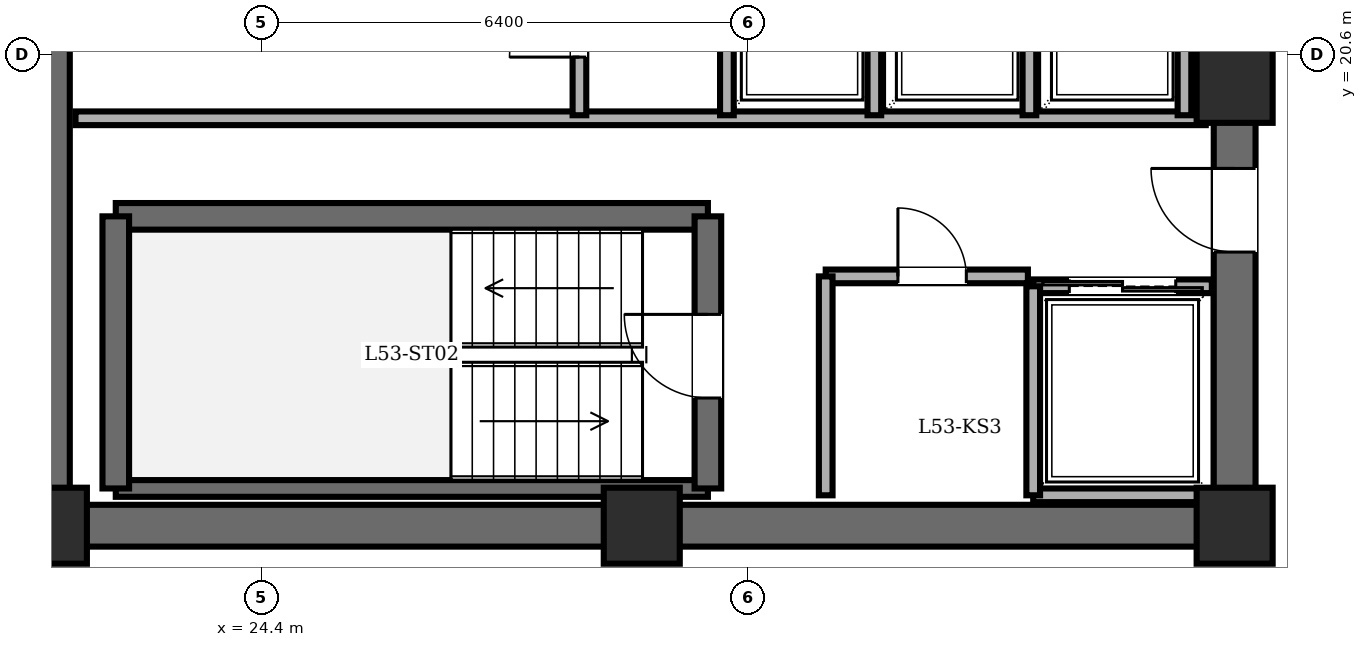
"""IFC4 building model, lengths in metres.
Left out: names, types, materials, properties, quantities, classifications, styles, units other than length and angle.
Written with IfcOpenShell. Run it as: python <this file> out.ifc"""

import sys

from ifc_helpers import new_model, si_unit, direction, frame, frame_2d, origin, origin_2d, place, context, subcontext, project, spatial, rectangle, extrude, element, fill, save


model = new_model("IFC4")
c1 = context("Model", 3, precision=1e-05, world=origin(), true_north=direction((0.0, 1.0)))
c2 = subcontext(c1, "Body", "Model", "MODEL_VIEW")
j1 = project(units=[si_unit("LENGTHUNIT", "METRE"), si_unit("PLANEANGLEUNIT", "RADIAN")], contexts=[c1])
p1 = place(None, origin())
s1 = spatial("IfcSite", under=j1, at=p1, CompositionType="ELEMENT")
p2 = place(p1, origin())
s2 = spatial("IfcBuilding", under=s1, at=p2, CompositionType="ELEMENT")
p3 = place(p2, frame((0.0, 0.0, 204.9)))
s3 = spatial("IfcBuildingStorey", under=s2, at=p3, CompositionType="ELEMENT", Elevation=204.9)
for number, where, z_axis, x_axis in (
    (1, (21.6, 14.4, 0.0), (0.0, 0.0, 1.0), (1.0, 0.0, 0.0)),
    (2, (29.4, 14.4, 0.0), (0.0, 0.0, 1.0), (1.0, 0.0, 0.0)),
    (3, (37.2, 14.4, 0.0), (0.0, 0.0, 1.0), (1.0, 0.0, 0.0)),
    (4, (37.2, 20.2, 0.0), (0.0, 0.0, 1.0), (1.0, 0.0, 0.0)),
):
    element("IfcColumn", number, at=place(p3, frame(where, z_axis=z_axis, x_axis=x_axis)), inside=s3, PredefinedType="COLUMN", context=c2, shape_type="SweptSolid", body=[
        extrude(rectangle(XDim=1.0, YDim=1.0, at=origin_2d()), origin(), (0.0, 0.0, 1.0), 3.6),
    ])
p4 = place(p3, frame((21.6, 14.4, 0.0), z_axis=(0.0, 0.0, 1.0), x_axis=(0.0, 1.0, 0.0)))
e5 = element("IfcWall", 5, at=p4, inside=s3, PredefinedType="SHEAR", context=c2, shape_type="SweptSolid", body=[
    extrude(rectangle(XDim=19.2, YDim=0.55, at=frame_2d((9.6, 0.0))), origin(), (0.0, 0.0, 1.0), 3.4),
])
p5 = place(p3, frame((37.2, 14.4, 0.0), z_axis=(0.0, 0.0, 1.0), x_axis=(-1.0, 0.0, 0.0)))
e6 = element("IfcWall", 6, at=p5, inside=s3, PredefinedType="SHEAR", context=c2, shape_type="SweptSolid", body=[
    extrude(rectangle(XDim=15.6, YDim=0.55, at=frame_2d((7.8, 0.0))), origin(), (0.0, 0.0, 1.0), 3.4),
])
p6 = place(p3, frame((37.2, 14.4, 0.0), z_axis=(0.0, 0.0, 1.0), x_axis=(0.0, 1.0, 0.0)))
e7 = element("IfcWall", 7, at=p6, inside=s3, PredefinedType="SHEAR", context=c2, shape_type="SweptSolid", body=[
    extrude(rectangle(XDim=19.2, YDim=0.55, at=frame_2d((9.6, 0.0))), origin(), (0.0, 0.0, 1.0), 3.4),
])
p7 = place(p6, frame((15.8, 0.0, 0.0)))
e8 = element("IfcOpeningElement", 8, at=p7, cuts=e7, PredefinedType="OPENING", context=c2, shape_type="SweptSolid", body=[
    extrude(rectangle(XDim=1.15, YDim=2.15, at=frame_2d((0.575, 1.075))), frame((0.0, 0.285, 0.0), z_axis=(0.0, -1.0, 0.0), x_axis=(1.0, 0.0, 0.0)), (0.0, 0.0, 1.0), 0.57),
])
p8 = place(p6, frame((3.6, 0.0, 0.0)))
e9 = element("IfcOpeningElement", 9, at=p8, cuts=e7, PredefinedType="OPENING", context=c2, shape_type="SweptSolid", body=[
    extrude(rectangle(XDim=1.1, YDim=2.15, at=frame_2d((0.55, 1.075))), frame((0.0, 0.285, 0.0), z_axis=(0.0, -1.0, 0.0), x_axis=(1.0, 0.0, 0.0)), (0.0, 0.0, 1.0), 0.57),
])
p9 = place(p6, frame((8.6, 0.0, 0.0)))
e10 = element("IfcOpeningElement", 10, at=p9, cuts=e7, PredefinedType="OPENING", context=c2, shape_type="SweptSolid", body=[
    extrude(rectangle(XDim=1.3, YDim=2.2, at=frame_2d((0.65, 1.1))), frame((0.0, 0.285, 0.0), z_axis=(0.0, -1.0, 0.0), x_axis=(1.0, 0.0, 0.0)), (0.0, 0.0, 1.0), 0.57),
])
p10 = place(p3, frame((22.48, 18.47, 0.0), z_axis=(0.0, 0.0, 1.0), x_axis=(1.0, 0.0, 0.0)))
e11 = element("IfcWall", 11, at=p10, inside=s3, PredefinedType="SOLIDWALL", context=c2, shape_type="SweptSolid", body=[
    extrude(rectangle(XDim=7.79, YDim=0.35, at=frame_2d((3.895, 0.0))), origin(), (0.0, 0.0, 1.0), 3.4),
])
p11 = place(p3, frame((22.48, 14.89, 0.0), z_axis=(0.0, 0.0, 1.0), x_axis=(1.0, 0.0, 0.0)))
e12 = element("IfcWall", 12, at=p11, inside=s3, PredefinedType="PARTITIONING", context=c2, shape_type="SweptSolid", body=[
    extrude(rectangle(XDim=7.79, YDim=0.22, at=frame_2d((3.895, 0.0))), origin(), (0.0, 0.0, 1.0), 3.4),
])
p12 = place(p3, frame((22.48, 14.89, 0.0), z_axis=(0.0, 0.0, 1.0), x_axis=(0.0, 1.0, 0.0)))
e13 = element("IfcWall", 13, at=p12, inside=s3, PredefinedType="SOLIDWALL", context=c2, shape_type="SweptSolid", body=[
    extrude(rectangle(XDim=3.58, YDim=0.35, at=frame_2d((1.79, 0.0))), origin(), (0.0, 0.0, 1.0), 3.4),
])
p13 = place(p3, frame((30.27, 14.89, 0.0), z_axis=(0.0, 0.0, 1.0), x_axis=(0.0, 1.0, 0.0)))
e14 = element("IfcWall", 14, at=p13, inside=s3, PredefinedType="SOLIDWALL", context=c2, shape_type="SweptSolid", body=[
    extrude(rectangle(XDim=3.58, YDim=0.35, at=frame_2d((1.79, 0.0))), origin(), (0.0, 0.0, 1.0), 3.4),
])
p14 = place(p13, frame((1.19, 0.0, 0.0)))
e15 = element("IfcOpeningElement", 15, at=p14, cuts=e14, PredefinedType="OPENING", context=c2, shape_type="SweptSolid", body=[
    extrude(rectangle(XDim=1.1, YDim=2.15, at=frame_2d((0.55, 1.075))), frame((0.0, 0.185, 0.0), z_axis=(0.0, -1.0, 0.0), x_axis=(1.0, 0.0, 0.0)), (0.0, 0.0, 1.0), 0.37),
])
p15 = place(p3, frame((21.95, 19.76, 0.0), z_axis=(0.0, 0.0, 1.0), x_axis=(1.0, 0.0, 0.0)))
e16 = element("IfcWall", 16, at=p15, inside=s3, PredefinedType="PARTITIONING", context=c2, shape_type="SweptSolid", body=[
    extrude(rectangle(XDim=14.87, YDim=0.18, at=frame_2d((7.435, 0.0))), origin(), (0.0, 0.0, 1.0), 3.4),
])
p16 = place(p3, frame((31.82, 17.68, 0.0), z_axis=(0.0, 0.0, 1.0), x_axis=(1.0, 0.0, 0.0)))
e17 = element("IfcWall", 17, at=p16, inside=s3, PredefinedType="PARTITIONING", context=c2, shape_type="SweptSolid", body=[
    extrude(rectangle(XDim=2.66, YDim=0.18, at=frame_2d((1.33, 0.0))), origin(), (0.0, 0.0, 1.0), 3.4),
])
p17 = place(p16, frame((0.95, 0.0, 0.0)))
e18 = element("IfcOpeningElement", 18, at=p17, cuts=e17, PredefinedType="OPENING", context=c2, shape_type="SweptSolid", body=[
    extrude(rectangle(XDim=0.9, YDim=2.05, at=frame_2d((0.45, 1.025))), frame((0.0, 0.1, 0.0), z_axis=(0.0, -1.0, 0.0), x_axis=(1.0, 0.0, 0.0)), (0.0, 0.0, 1.0), 0.2),
])
p18 = place(p3, frame((31.82, 14.8, 0.0), z_axis=(0.0, 0.0, 1.0), x_axis=(0.0, 1.0, 0.0)))
e19 = element("IfcWall", 19, at=p18, inside=s3, PredefinedType="PARTITIONING", context=c2, shape_type="SweptSolid", body=[
    extrude(rectangle(XDim=2.88, YDim=0.18, at=frame_2d((1.44, 0.0))), origin(), (0.0, 0.0, 1.0), 3.4),
])
p19 = place(p3, frame((34.55, 17.55, 0.0), z_axis=(0.0, 0.0, 1.0), x_axis=(1.0, 0.0, 0.0)))
e20 = element("IfcWall", 20, at=p19, inside=s3, PredefinedType="PARTITIONING", context=c2, shape_type="SweptSolid", body=[
    extrude(rectangle(XDim=2.35, YDim=0.18, at=frame_2d((1.175, 0.0))), origin(), (0.0, 0.0, 1.0), 3.4),
])
p20 = place(p19, frame((0.475, 0.0, 0.0)))
e21 = element("IfcOpeningElement", 21, at=p20, cuts=e20, PredefinedType="OPENING", context=c2, shape_type="SweptSolid", body=[
    extrude(rectangle(XDim=1.4, YDim=2.3, at=frame_2d((0.7, 1.15))), frame((0.0, 0.1, 0.0), z_axis=(0.0, -1.0, 0.0), x_axis=(1.0, 0.0, 0.0)), (0.0, 0.0, 1.0), 0.2),
])
p21 = place(p3, frame((36.9, 14.8, 0.0), z_axis=(0.0, 0.0, 1.0), x_axis=(-1.0, 0.0, 0.0)))
e22 = element("IfcWall", 22, at=p21, inside=s3, PredefinedType="PARTITIONING", context=c2, shape_type="SweptSolid", body=[
    extrude(rectangle(XDim=2.35, YDim=0.18, at=frame_2d((1.175, 0.0))), origin(), (0.0, 0.0, 1.0), 3.4),
])
p22 = place(p3, frame((34.55, 17.55, 0.0), z_axis=(0.0, 0.0, 1.0), x_axis=(0.0, -1.0, 0.0)))
e23 = element("IfcWall", 23, at=p22, inside=s3, PredefinedType="PARTITIONING", context=c2, shape_type="SweptSolid", body=[
    extrude(rectangle(XDim=2.75, YDim=0.18, at=frame_2d((1.375, 0.0))), origin(), (0.0, 0.0, 1.0), 3.4),
])
for number, where, z_axis, x_axis in (
    (24, (32.46, 19.8, 0.0), (0.0, 0.0, 1.0), (0.0, 1.0, 0.0)),
    (25, (34.5, 19.8, 0.0), (0.0, 0.0, 1.0), (0.0, 1.0, 0.0)),
    (26, (36.54, 19.8, 0.0), (0.0, 0.0, 1.0), (0.0, 1.0, 0.0)),
):
    element("IfcWall", number, at=place(p3, frame(where, z_axis=z_axis, x_axis=x_axis)), inside=s3, PredefinedType="PARTITIONING", context=c2, shape_type="SweptSolid", body=[
        extrude(rectangle(XDim=2.5, YDim=0.18, at=frame_2d((1.25, 0.0))), origin(), (0.0, 0.0, 1.0), 3.4),
    ])
p23 = place(p3, frame((30.52, 19.8, 0.0), z_axis=(0.0, 0.0, 1.0), x_axis=(0.0, 1.0, 0.0)))
e27 = element("IfcWall", 27, at=p23, inside=s3, PredefinedType="PARTITIONING", context=c2, shape_type="SweptSolid", body=[
    extrude(rectangle(XDim=2.55, YDim=0.18, at=frame_2d((1.275, 0.0))), origin(), (0.0, 0.0, 1.0), 3.4),
])
p24 = place(p3, frame((28.58, 19.8, 0.0), z_axis=(0.0, 0.0, 1.0), x_axis=(0.0, 1.0, 0.0)))
e28 = element("IfcWall", 28, at=p24, inside=s3, PredefinedType="PARTITIONING", context=c2, shape_type="SweptSolid", body=[
    extrude(rectangle(XDim=2.45, YDim=0.18, at=frame_2d((1.225, 0.0))), origin(), (0.0, 0.0, 1.0), 3.4),
])
p25 = place(p24, frame((0.765, 0.0, 0.0)))
e29 = element("IfcOpeningElement", 29, at=p25, cuts=e28, PredefinedType="OPENING", context=c2, shape_type="SweptSolid", body=[
    extrude(rectangle(XDim=0.92, YDim=2.1, at=frame_2d((0.46, 1.05))), frame((0.0, 0.1, 0.0), z_axis=(0.0, -1.0, 0.0), x_axis=(1.0, 0.0, 0.0)), (0.0, 0.0, 1.0), 0.2),
])
p26 = place(p14, origin())
e30 = element("IfcDoor", 30, at=p26, inside=s3, OperationType="SINGLE_SWING_RIGHT", PredefinedType="DOOR", context=c2, shape_type="SweptSolid", body=[
    extrude(rectangle(XDim=1.1, YDim=2.15, at=frame_2d((0.55, 1.075))), frame((0.0, 0.025, 0.0), z_axis=(0.0, -1.0, 0.0), x_axis=(1.0, 0.0, 0.0)), (0.0, 0.0, 1.0), 0.05),
])
fill(e15, e30)
p27 = place(p8, origin())
e31 = element("IfcDoor", 31, at=p27, inside=s3, OperationType="SINGLE_SWING_RIGHT", PredefinedType="DOOR", context=c2, shape_type="SweptSolid", body=[
    extrude(rectangle(XDim=1.1, YDim=2.15, at=frame_2d((0.55, 1.075))), frame((0.0, 0.025, 0.0), z_axis=(0.0, -1.0, 0.0), x_axis=(1.0, 0.0, 0.0)), (0.0, 0.0, 1.0), 0.05),
])
fill(e9, e31)
p28 = place(p17, origin())
e32 = element("IfcDoor", 32, at=p28, inside=s3, OperationType="SINGLE_SWING_LEFT", PredefinedType="DOOR", context=c2, shape_type="SweptSolid", body=[
    extrude(rectangle(XDim=0.9, YDim=2.05, at=frame_2d((0.45, 1.025))), frame((0.0, 0.025, 0.0), z_axis=(0.0, -1.0, 0.0), x_axis=(1.0, 0.0, 0.0)), (0.0, 0.0, 1.0), 0.05),
])
fill(e18, e32)
p29 = place(p20, origin())
e33 = element("IfcDoor", 33, at=p29, inside=s3, OperationType="DOUBLE_DOOR_SLIDING", PredefinedType="DOOR", context=c2, shape_type="SweptSolid", body=[
    extrude(rectangle(XDim=1.4, YDim=2.3, at=frame_2d((0.7, 1.15))), frame((0.0, 0.025, 0.0), z_axis=(0.0, -1.0, 0.0), x_axis=(1.0, 0.0, 0.0)), (0.0, 0.0, 1.0), 0.05),
])
fill(e21, e33)
p30 = place(p25, origin())
e34 = element("IfcDoor", 34, at=p30, inside=s3, OperationType="SINGLE_SWING_LEFT", PredefinedType="DOOR", context=c2, shape_type="SweptSolid", body=[
    extrude(rectangle(XDim=0.92, YDim=2.1, at=frame_2d((0.46, 1.05))), frame((0.0, 0.025, 0.0), z_axis=(0.0, -1.0, 0.0), x_axis=(1.0, 0.0, 0.0)), (0.0, 0.0, 1.0), 0.05),
])
fill(e29, e34)
save(model, sys.argv[1])
